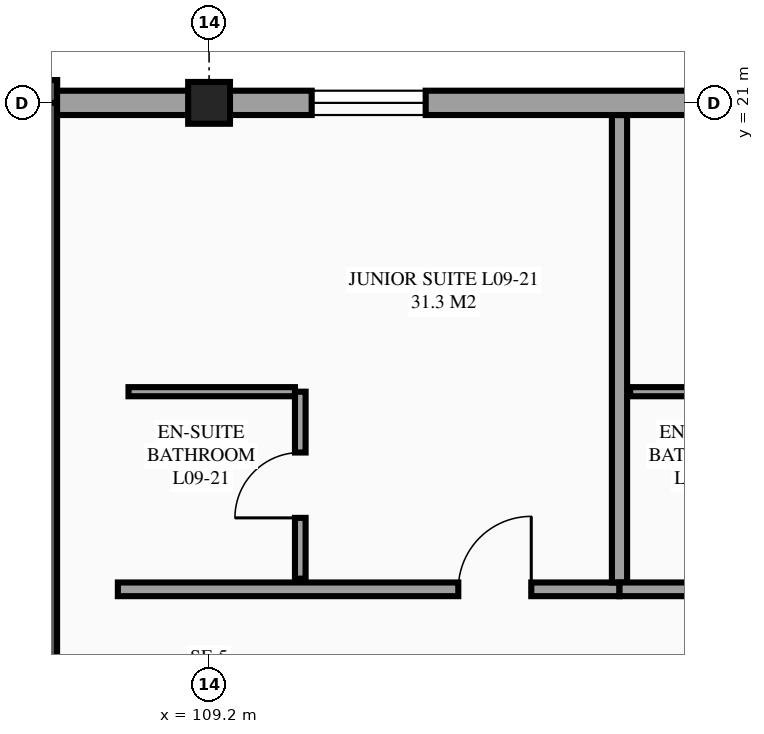
"""IFC4 building model, lengths in metres.
Left out: names, types, materials, properties, quantities, classifications, styles, units other than length and angle.
Written with IfcOpenShell. Run it as: python <this file> out.ifc"""

import sys

from ifc_helpers import new_model, si_unit, direction, frame, frame_2d, origin, origin_2d, place, context, subcontext, project, spatial, rectangle, extrude, element, fill, save


model = new_model("IFC4")
c1 = context("Model", 3, precision=1e-05, world=origin(), true_north=direction((0.0, 1.0)))
c2 = subcontext(c1, "Body", "Model", "MODEL_VIEW")
j1 = project(units=[si_unit("LENGTHUNIT", "METRE"), si_unit("PLANEANGLEUNIT", "RADIAN")], contexts=[c1])
p1 = place(None, origin())
s1 = spatial("IfcSite", under=j1, at=p1, CompositionType="ELEMENT")
p2 = place(p1, origin())
s2 = spatial("IfcBuilding", under=s1, at=p2, CompositionType="ELEMENT")
p3 = place(p2, frame((0.0, 0.0, 36.3)))
s3 = spatial("IfcBuildingStorey", under=s2, at=p3, CompositionType="ELEMENT", Elevation=36.3)
p4 = place(p3, frame((109.2, 21.0, 0.0), z_axis=(0.0, 0.0, 1.0), x_axis=(1.0, 0.0, 0.0)))
e1 = element("IfcColumn", 1, at=p4, inside=s3, PredefinedType="COLUMN", context=c2, shape_type="SweptSolid", body=[
    extrude(rectangle(XDim=0.55, YDim=0.55, at=origin_2d()), origin(), (0.0, 0.0, 1.0), 3.6),
])
p5 = place(p3, frame((107.05, 12.46, 0.0), z_axis=(0.0, 0.0, 1.0), x_axis=(0.0, 1.0, 0.0)))
e2 = element("IfcWall", 2, at=p5, inside=s3, PredefinedType="SHEAR", context=c2, shape_type="SweptSolid", body=[
    extrude(rectangle(XDim=8.84, YDim=0.3, at=frame_2d((4.42, 0.0))), origin(), (0.0, 0.0, 1.0), 3.6),
])
p6 = place(p3, frame((107.2, 21.15, 0.0), z_axis=(0.0, 0.0, 1.0), x_axis=(-1.0, 0.0, 0.0)))
e3 = element("IfcWall", 3, at=p6, inside=s3, PredefinedType="SHEAR", context=c2, shape_type="SweptSolid", body=[
    extrude(rectangle(XDim=5.2, YDim=0.3, at=frame_2d((2.6, 0.0))), origin(), (0.0, 0.0, 1.0), 3.6),
])
p7 = place(p3, frame((108.0, 14.6, 0.0), z_axis=(0.0, 0.0, 1.0), x_axis=(1.0, 0.0, 0.0)))
e4 = element("IfcWall", 4, at=p7, inside=s3, PredefinedType="PARTITIONING", context=c2, shape_type="SweptSolid", body=[
    extrude(rectangle(XDim=6.6, YDim=0.18, at=frame_2d((3.3, 0.0))), origin(), (0.0, 0.0, 1.0), 3.375),
])
p8 = place(p7, frame((4.479, 0.0, 0.0)))
e5 = element("IfcOpeningElement", 5, at=p8, cuts=e4, PredefinedType="OPENING", context=c2, shape_type="SweptSolid", body=[
    extrude(rectangle(XDim=0.96, YDim=2.15, at=frame_2d((0.48, 1.075))), frame((0.0, 0.1, 0.0), z_axis=(0.0, -1.0, 0.0), x_axis=(1.0, 0.0, 0.0)), (0.0, 0.0, 1.0), 0.2),
])
p9 = place(p3, frame((114.6, 14.69, 0.0), z_axis=(0.0, 0.0, 1.0), x_axis=(0.0, 1.0, 0.0)))
e6 = element("IfcWall", 6, at=p9, inside=s3, PredefinedType="PARTITIONING", context=c2, shape_type="SweptSolid", body=[
    extrude(rectangle(XDim=6.15, YDim=0.2, at=frame_2d((3.075, 0.0))), origin(), (0.0, 0.0, 1.0), 3.375),
])
p10 = place(p3, frame((110.4, 14.74, 0.0), z_axis=(0.0, 0.0, 1.0), x_axis=(0.0, 1.0, 0.0)))
e7 = element("IfcWall", 7, at=p10, inside=s3, PredefinedType="PARTITIONING", context=c2, shape_type="SweptSolid", body=[
    extrude(rectangle(XDim=2.46, YDim=0.14, at=frame_2d((1.23, 0.0))), origin(), (0.0, 0.0, 1.0), 3.375),
])
p11 = place(p10, frame((0.8, 0.0, 0.0)))
e8 = element("IfcOpeningElement", 8, at=p11, cuts=e7, PredefinedType="OPENING", context=c2, shape_type="SweptSolid", body=[
    extrude(rectangle(XDim=0.86, YDim=2.1, at=frame_2d((0.43, 1.05))), frame((0.0, 0.08, 0.0), z_axis=(0.0, -1.0, 0.0), x_axis=(1.0, 0.0, 0.0)), (0.0, 0.0, 1.0), 0.16),
])
p12 = place(p3, frame((108.14, 17.2, 0.0), z_axis=(0.0, 0.0, 1.0), x_axis=(1.0, 0.0, 0.0)))
e9 = element("IfcWall", 9, at=p12, inside=s3, PredefinedType="PARTITIONING", context=c2, shape_type="SweptSolid", body=[
    extrude(rectangle(XDim=2.19, YDim=0.12, at=frame_2d((1.095, 0.0))), origin(), (0.0, 0.0, 1.0), 3.375),
])
p13 = place(p3, frame((114.6, 14.6, 0.0), z_axis=(0.0, 0.0, 1.0), x_axis=(1.0, 0.0, 0.0)))
e10 = element("IfcWall", 10, at=p13, inside=s3, PredefinedType="PARTITIONING", context=c2, shape_type="SweptSolid", body=[
    extrude(rectangle(XDim=6.6, YDim=0.18, at=frame_2d((3.3, 0.0))), origin(), (0.0, 0.0, 1.0), 3.375),
])
p14 = place(p13, frame((4.479, 0.0, 0.0)))
e11 = element("IfcOpeningElement", 11, at=p14, cuts=e10, PredefinedType="OPENING", context=c2, shape_type="SweptSolid", body=[
    extrude(rectangle(XDim=0.96, YDim=2.15, at=frame_2d((0.48, 1.075))), frame((0.0, 0.1, 0.0), z_axis=(0.0, -1.0, 0.0), x_axis=(1.0, 0.0, 0.0)), (0.0, 0.0, 1.0), 0.2),
])
p15 = place(p3, frame((114.74, 17.2, 0.0), z_axis=(0.0, 0.0, 1.0), x_axis=(1.0, 0.0, 0.0)))
e12 = element("IfcWall", 12, at=p15, inside=s3, PredefinedType="PARTITIONING", context=c2, shape_type="SweptSolid", body=[
    extrude(rectangle(XDim=2.19, YDim=0.12, at=frame_2d((1.095, 0.0))), origin(), (0.0, 0.0, 1.0), 3.375),
])
p16 = place(p3, frame((117.6, 21.0, 0.0), z_axis=(0.0, 0.0, 1.0), x_axis=(-1.0, 0.0, 0.0)))
e13 = element("IfcWall", 13, at=p16, inside=s3, PredefinedType="STANDARD", context=c2, shape_type="SweptSolid", body=[
    extrude(rectangle(XDim=8.4, YDim=0.32, at=frame_2d((4.2, 0.0))), origin(), (0.0, 0.0, 1.0), 3.133),
])
p17 = place(p16, frame((5.55, 0.0, 0.85)))
e14 = element("IfcOpeningElement", 14, at=p17, cuts=e13, PredefinedType="OPENING", context=c2, shape_type="SweptSolid", body=[
    extrude(rectangle(XDim=1.5, YDim=1.5, at=frame_2d((0.75, 0.75))), frame((0.0, 0.17, 0.0), z_axis=(0.0, -1.0, 0.0), x_axis=(1.0, 0.0, 0.0)), (0.0, 0.0, 1.0), 0.34),
])
p18 = place(p3, frame((109.2, 21.0, 0.0), z_axis=(0.0, 0.0, 1.0), x_axis=(-1.0, 0.0, 0.0)))
e15 = element("IfcWall", 15, at=p18, inside=s3, PredefinedType="STANDARD", context=c2, shape_type="SweptSolid", body=[
    extrude(rectangle(XDim=2.0, YDim=0.32, at=frame_2d((1.0, 0.0))), origin(), (0.0, 0.0, 1.0), 2.53),
])
p19 = place(p17, origin())
e16 = element("IfcWindow", 16, at=p19, inside=s3, PartitioningType="SINGLE_PANEL", PredefinedType="WINDOW", context=c2, shape_type="SweptSolid", body=[
    extrude(rectangle(XDim=1.5, YDim=1.5, at=frame_2d((0.75, 0.75))), frame((0.0, 0.03, 0.0), z_axis=(0.0, -1.0, 0.0), x_axis=(1.0, 0.0, 0.0)), (0.0, 0.0, 1.0), 0.06),
])
fill(e14, e16)
p20 = place(p8, origin())
e17 = element("IfcDoor", 17, at=p20, inside=s3, OperationType="SINGLE_SWING_RIGHT", PredefinedType="DOOR", context=c2, shape_type="SweptSolid", body=[
    extrude(rectangle(XDim=0.96, YDim=2.15, at=frame_2d((0.48, 1.075))), frame((0.0, 0.025, 0.0), z_axis=(0.0, -1.0, 0.0), x_axis=(1.0, 0.0, 0.0)), (0.0, 0.0, 1.0), 0.05),
])
fill(e5, e17)
p21 = place(p11, origin())
e18 = element("IfcDoor", 18, at=p21, inside=s3, OperationType="SINGLE_SWING_LEFT", PredefinedType="DOOR", context=c2, shape_type="SweptSolid", body=[
    extrude(rectangle(XDim=0.86, YDim=2.1, at=frame_2d((0.43, 1.05))), frame((0.0, 0.025, 0.0), z_axis=(0.0, -1.0, 0.0), x_axis=(1.0, 0.0, 0.0)), (0.0, 0.0, 1.0), 0.05),
])
fill(e8, e18)
save(model, sys.argv[1])
